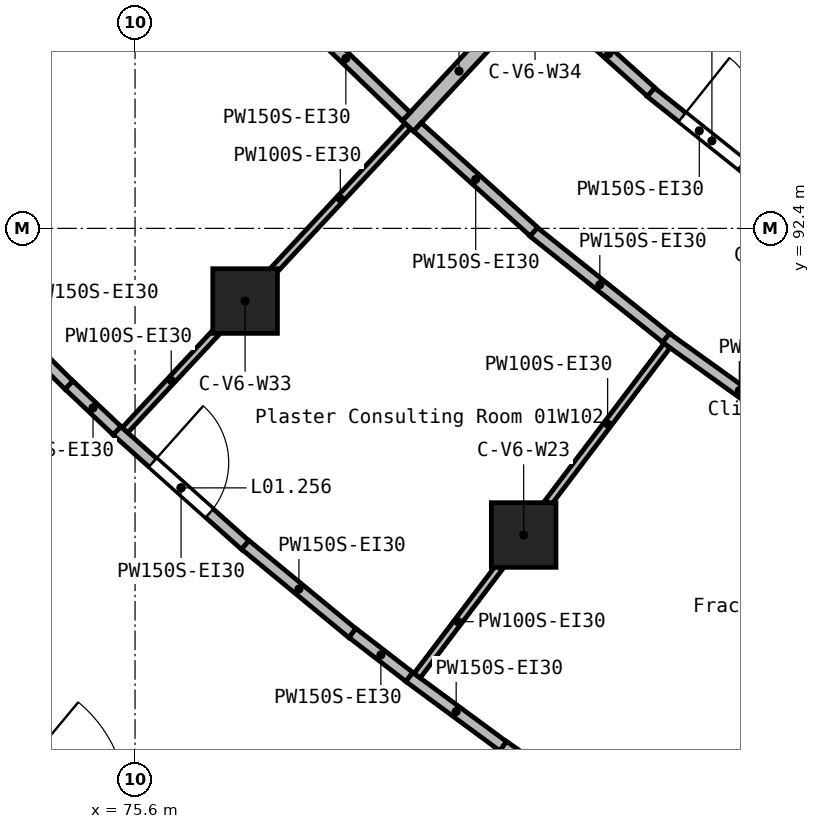
"""IFC4 building model, lengths in metres.
Left out: names, types, materials, properties, quantities, classifications, styles, units other than length and angle.
Written with IfcOpenShell. Run it as: python <this file> out.ifc"""

import sys

from ifc_helpers import new_model, si_unit, direction, frame, frame_2d, origin, origin_2d, place, context, subcontext, project, spatial, rectangle, extrude, element, fill, save


model = new_model("IFC4")
c1 = context("Model", 3, precision=1e-05, world=origin(), true_north=direction((0.0, 1.0)))
c2 = subcontext(c1, "Body", "Model", "MODEL_VIEW")
j1 = project(units=[si_unit("LENGTHUNIT", "METRE"), si_unit("PLANEANGLEUNIT", "RADIAN")], contexts=[c1])
p1 = place(None, origin())
s1 = spatial("IfcSite", under=j1, at=p1, CompositionType="ELEMENT")
p2 = place(p1, origin())
s2 = spatial("IfcBuilding", under=s1, at=p2, CompositionType="ELEMENT")
p3 = place(p2, frame((0.0, 0.0, 5.4)))
s3 = spatial("IfcBuildingStorey", under=s2, at=p3, CompositionType="ELEMENT", Elevation=5.4)
for number, where, z_axis, x_axis in (
    (1, (77.048, 91.444, 0.0), (0.0, 0.0, 1.0), (1.0, 0.0, 0.0)),
    (2, (80.713, 88.366, 0.0), (0.0, 0.0, 1.0), (1.0, 0.0, 0.0)),
):
    element("IfcColumn", number, at=place(p3, frame(where, z_axis=z_axis, x_axis=x_axis)), inside=s3, PredefinedType="COLUMN", context=c2, shape_type="SweptSolid", body=[
        extrude(rectangle(XDim=0.85, YDim=0.85, at=origin_2d()), origin(), (0.0, 0.0, 1.0), 4.5),
    ])
p4 = place(p3, frame((79.19, 93.746, 0.0), z_axis=(0.0, 0.0, 1.0), x_axis=(0.681171780306, 0.732123627344, 0.0)))
e3 = element("IfcWall", 3, at=p4, inside=s3, PredefinedType="SOLIDWALL", context=c2, shape_type="SweptSolid", body=[
    extrude(rectangle(XDim=1.974, YDim=0.2, at=frame_2d((0.987, 0.0))), origin(), (0.0, 0.0, 1.0), 4.15),
])
p5 = place(p3, frame((82.583, 90.961, 0.0), z_axis=(0.0, 0.0, 1.0), x_axis=(0.812456963848, -0.583021167622, 0.0)))
e4 = element("IfcWall", 4, at=p5, inside=s3, PredefinedType="PARTITIONING", context=c2, shape_type="SweptSolid", body=[
    extrude(rectangle(XDim=2.381, YDim=0.15, at=frame_2d((1.191, 0.0))), origin(), (0.0, 0.0, 1.0), 4.15),
])
p6 = place(p3, frame((80.841, 92.356, 0.0), z_axis=(0.0, 0.0, 1.0), x_axis=(0.781561025488, -0.62382879337, 0.0)))
e5 = element("IfcWall", 5, at=p6, inside=s3, PredefinedType="PARTITIONING", context=c2, shape_type="SweptSolid", body=[
    extrude(rectangle(XDim=2.235, YDim=0.15, at=frame_2d((1.118, 0.0))), origin(), (0.0, 0.0, 1.0), 4.15),
])
p7 = place(p3, frame((77.579, 95.4, 0.0), z_axis=(0.0, 0.0, 1.0), x_axis=(0.720594722174, -0.693356507415, 0.0)))
e6 = element("IfcWall", 6, at=p7, inside=s3, PredefinedType="PARTITIONING", context=c2, shape_type="SweptSolid", body=[
    extrude(rectangle(XDim=2.205, YDim=0.15, at=frame_2d((1.103, 0.0))), origin(), (0.0, 0.0, 1.0), 4.15),
])
p8 = place(p3, frame((79.316, 93.733, 0.0), z_axis=(0.0, 0.0, 1.0), x_axis=(0.74346507851, -0.668774758073, 0.0)))
e7 = element("IfcWall", 7, at=p8, inside=s3, PredefinedType="PARTITIONING", context=c2, shape_type="SweptSolid", body=[
    extrude(rectangle(XDim=2.059, YDim=0.15, at=frame_2d((1.03, 0.0))), origin(), (0.0, 0.0, 1.0), 4.15),
])
p9 = place(p3, frame((75.36, 89.74, 0.0), z_axis=(0.0, 0.0, 1.0), x_axis=(0.746361982095, -0.665540225443, 0.0)))
e8 = element("IfcWall", 8, at=p9, inside=s3, PredefinedType="PARTITIONING", context=c2, shape_type="SweptSolid", body=[
    extrude(rectangle(XDim=2.266, YDim=0.15, at=frame_2d((1.133, 0.0))), origin(), (0.0, 0.0, 1.0), 4.15),
])
p10 = place(p9, frame((0.633, 0.0, 0.0)))
e9 = element("IfcOpeningElement", 9, at=p10, cuts=e8, PredefinedType="OPENING", context=c2, shape_type="SweptSolid", body=[
    extrude(rectangle(XDim=1.0, YDim=2.1, at=frame_2d((0.5, 1.05))), frame((0.0, 0.085, 0.0), z_axis=(0.0, -1.0, 0.0), x_axis=(1.0, 0.0, 0.0)), (0.0, 0.0, 1.0), 0.17),
])
p11 = place(p3, frame((82.385, 94.194, 0.0), z_axis=(0.0, 0.0, 1.0), x_axis=(0.781756052881, -0.623584375833, 0.0)))
e10 = element("IfcWall", 10, at=p11, inside=s3, PredefinedType="PARTITIONING", context=c2, shape_type="SweptSolid", body=[
    extrude(rectangle(XDim=1.636, YDim=0.15, at=frame_2d((0.818, 0.0))), origin(), (0.0, 0.0, 1.0), 4.15),
])
p12 = place(p11, frame((0.53, 0.0, 0.0)))
e11 = element("IfcOpeningElement", 11, at=p12, cuts=e10, PredefinedType="OPENING", context=c2, shape_type="SweptSolid", body=[
    extrude(rectangle(XDim=1.0, YDim=2.1, at=frame_2d((0.5, 1.05))), frame((0.0, 0.085, 0.0), z_axis=(0.0, -1.0, 0.0), x_axis=(1.0, 0.0, 0.0)), (0.0, 0.0, 1.0), 0.17),
])
p13 = place(p3, frame((81.273, 95.199, 0.0), z_axis=(0.0, 0.0, 1.0), x_axis=(0.743576936712, -0.668650386368, 0.0)))
e12 = element("IfcWall", 12, at=p13, inside=s3, PredefinedType="PARTITIONING", context=c2, shape_type="SweptSolid", body=[
    extrude(rectangle(XDim=1.502, YDim=0.15, at=frame_2d((0.751, 0.0))), origin(), (0.0, 0.0, 1.0), 4.15),
])
p14 = place(p3, frame((77.051, 88.236, 0.0), z_axis=(0.0, 0.0, 1.0), x_axis=(0.771517511576, -0.636208086502, 0.0)))
e13 = element("IfcWall", 13, at=p14, inside=s3, PredefinedType="PARTITIONING", context=c2, shape_type="SweptSolid", body=[
    extrude(rectangle(XDim=1.828, YDim=0.15, at=frame_2d((0.914, 0.0))), origin(), (0.0, 0.0, 1.0), 4.15),
])
p15 = place(p3, frame((79.206, 86.5, 0.0), z_axis=(0.0, 0.0, 1.0), x_axis=(0.804960127747, -0.593328907721, 0.0)))
e14 = element("IfcWall", 14, at=p15, inside=s3, PredefinedType="PARTITIONING", context=c2, shape_type="SweptSolid", body=[
    extrude(rectangle(XDim=1.539, YDim=0.15, at=frame_2d((0.77, 0.0))), origin(), (0.0, 0.0, 1.0), 4.15),
])
p16 = place(p3, frame((73.851, 91.211, 0.0), z_axis=(0.0, 0.0, 1.0), x_axis=(0.709168733207, -0.70503879882, 0.0)))
e15 = element("IfcWall", 15, at=p16, inside=s3, PredefinedType="PARTITIONING", context=c2, shape_type="SweptSolid", body=[
    extrude(rectangle(XDim=1.241, YDim=0.15, at=frame_2d((0.621, 0.0))), origin(), (0.0, 0.0, 1.0), 4.15),
])
p17 = place(p3, frame((80.444, 85.589, 0.0), z_axis=(0.0, 0.0, 1.0), x_axis=(0.821096473197, -0.570789437274, 0.0)))
e16 = element("IfcWall", 16, at=p17, inside=s3, PredefinedType="PARTITIONING", context=c2, shape_type="SweptSolid", body=[
    extrude(rectangle(XDim=1.093, YDim=0.15, at=frame_2d((0.546, 0.0))), origin(), (0.0, 0.0, 1.0), 4.15),
])
p18 = place(p3, frame((78.46, 87.077, 0.0), z_axis=(0.0, 0.0, 1.0), x_axis=(0.791671493317, -0.610947008069, 0.0)))
e17 = element("IfcWall", 17, at=p18, inside=s3, PredefinedType="PARTITIONING", context=c2, shape_type="SweptSolid", body=[
    extrude(rectangle(XDim=0.944, YDim=0.15, at=frame_2d((0.472, 0.0))), origin(), (0.0, 0.0, 1.0), 4.15),
])
p19 = place(p3, frame((74.731, 90.339, 0.0), z_axis=(0.0, 0.0, 1.0), x_axis=(0.725923200466, -0.687775767984, 0.0)))
e18 = element("IfcWall", 18, at=p19, inside=s3, PredefinedType="PARTITIONING", context=c2, shape_type="SweptSolid", body=[
    extrude(rectangle(XDim=0.87, YDim=0.15, at=frame_2d((0.435, 0.0))), origin(), (0.0, 0.0, 1.0), 4.15),
])
p20 = place(p3, frame((75.468, 89.746, 0.0), z_axis=(0.0, 0.0, 1.0), x_axis=(0.681143154038, 0.732150260334, 0.0)))
e19 = element("IfcWall", 19, at=p20, inside=s3, PredefinedType="PARTITIONING", context=c2, shape_type="SweptSolid", body=[
    extrude(rectangle(XDim=1.785, YDim=0.1, at=frame_2d((0.893, 0.0))), origin(), (0.0, 0.0, 1.0), 4.15),
])
p21 = place(p3, frame((77.412, 91.835, 0.0), z_axis=(0.0, 0.0, 1.0), x_axis=(0.681147107729, 0.732146582067, 0.0)))
e20 = element("IfcWall", 20, at=p21, inside=s3, PredefinedType="PARTITIONING", context=c2, shape_type="SweptSolid", body=[
    extrude(rectangle(XDim=2.609, YDim=0.1, at=frame_2d((1.304, 0.0))), origin(), (0.0, 0.0, 1.0), 4.15),
])
p22 = place(p3, frame((79.312, 86.515, 0.0), z_axis=(0.0, 0.0, 1.0), x_axis=(0.603588624137, 0.797295912954, 0.0)))
e21 = element("IfcWall", 21, at=p22, inside=s3, PredefinedType="PARTITIONING", context=c2, shape_type="SweptSolid", body=[
    extrude(rectangle(XDim=1.782, YDim=0.1, at=frame_2d((0.891, 0.0))), origin(), (0.0, 0.0, 1.0), 4.15),
])
p23 = place(p3, frame((81.038, 88.796, 0.0), z_axis=(0.0, 0.0, 1.0), x_axis=(0.603561177332, 0.797316690668, 0.0)))
e22 = element("IfcWall", 22, at=p23, inside=s3, PredefinedType="PARTITIONING", context=c2, shape_type="SweptSolid", body=[
    extrude(rectangle(XDim=2.584, YDim=0.1, at=frame_2d((1.292, 0.0))), origin(), (0.0, 0.0, 1.0), 4.15),
])
p24 = place(p10, origin())
e23 = element("IfcDoor", 23, at=p24, inside=s3, OperationType="SINGLE_SWING_LEFT", PredefinedType="DOOR", context=c2, shape_type="SweptSolid", body=[
    extrude(rectangle(XDim=1.0, YDim=2.1, at=frame_2d((0.5, 1.05))), frame((0.0, 0.025, 0.0), z_axis=(0.0, -1.0, 0.0), x_axis=(1.0, 0.0, 0.0)), (0.0, 0.0, 1.0), 0.05),
])
fill(e9, e23)
p25 = place(p12, origin())
e24 = element("IfcDoor", 24, at=p25, inside=s3, OperationType="SINGLE_SWING_RIGHT", PredefinedType="DOOR", context=c2, shape_type="SweptSolid", body=[
    extrude(rectangle(XDim=1.0, YDim=2.1, at=frame_2d((0.5, 1.05))), frame((0.0, 0.025, 0.0), z_axis=(0.0, -1.0, 0.0), x_axis=(1.0, 0.0, 0.0)), (0.0, 0.0, 1.0), 0.05),
])
fill(e11, e24)
save(model, sys.argv[1])
